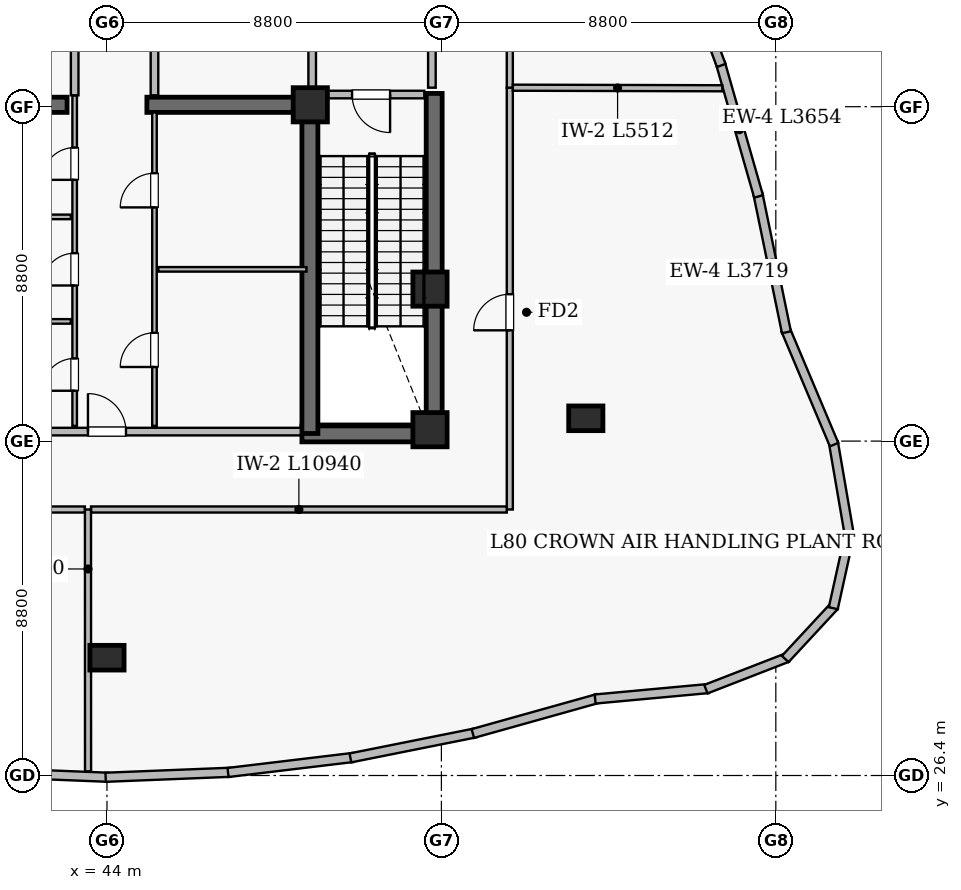
"""IFC4 building model, lengths in metres.
Left out: names, types, materials, properties, quantities, classifications, styles, units other than length and angle.
Written with IfcOpenShell. Run it as: python <this file> out.ifc"""

import sys

from ifc_helpers import new_model, si_unit, direction, frame, frame_2d, origin, origin_2d, place, context, subcontext, project, spatial, rectangle, extrude, element, fill, save


model = new_model("IFC4")
c1 = context("Model", 3, precision=1e-05, world=origin(), true_north=direction((0.0, 1.0)))
c2 = subcontext(c1, "Body", "Model", "MODEL_VIEW")
j1 = project(units=[si_unit("LENGTHUNIT", "METRE"), si_unit("PLANEANGLEUNIT", "RADIAN")], contexts=[c1])
p1 = place(None, origin())
s1 = spatial("IfcSite", under=j1, at=p1, CompositionType="ELEMENT")
p2 = place(p1, origin())
s2 = spatial("IfcBuilding", under=s1, at=p2, CompositionType="ELEMENT")
p3 = place(p2, frame((0.0, 0.0, 300.8)))
s3 = spatial("IfcBuildingStorey", under=s2, at=p3, CompositionType="ELEMENT", Elevation=300.8)
p4 = place(p3, frame((49.13, 35.39, 0.0), z_axis=(0.0, 0.0, 1.0), x_axis=(1.0, 0.0, 0.0)))
e1 = element("IfcWall", 1, at=p4, inside=s3, PredefinedType="SHEAR", context=c2, shape_type="SweptSolid", body=[
    extrude(rectangle(XDim=3.69, YDim=0.42, at=frame_2d((1.845, 0.0))), origin(), (0.0, 0.0, 1.0), 5.74),
])
p5 = place(p3, frame((52.61, 35.18, 0.0), z_axis=(0.0, 0.0, 1.0), x_axis=(0.0, 1.0, 0.0)))
e2 = element("IfcWall", 2, at=p5, inside=s3, PredefinedType="SHEAR", context=c2, shape_type="SweptSolid", body=[
    extrude(rectangle(XDim=9.17, YDim=0.42, at=frame_2d((4.585, 0.0))), origin(), (0.0, 0.0, 1.0), 5.74),
])
p6 = place(p3, frame((49.34, 35.4, 0.0), z_axis=(0.0, 0.0, 1.0), x_axis=(0.0, 1.0, 0.0)))
e3 = element("IfcWall", 3, at=p6, inside=s3, PredefinedType="SHEAR", context=c2, shape_type="SweptSolid", body=[
    extrude(rectangle(XDim=8.95, YDim=0.42, at=frame_2d((4.475, 0.0))), origin(), (0.0, 0.0, 1.0), 5.74),
])
for number, where, z_axis, x_axis in (
    (4, (38.75, 44.05, 0.0), (0.0, 0.0, 1.0), (1.0, 0.0, 0.0)),
    (5, (45.05, 44.05, 0.0), (0.0, 0.0, 1.0), (1.0, 0.0, 0.0)),
):
    element("IfcWall", number, at=place(p3, frame(where, z_axis=z_axis, x_axis=x_axis)), inside=s3, PredefinedType="SHEAR", context=c2, shape_type="SweptSolid", body=[
        extrude(rectangle(XDim=4.2, YDim=0.4, at=frame_2d((2.1, 0.0))), origin(), (0.0, 0.0, 1.0), 5.74),
    ])
for number, where, z_axis, x_axis in (
    (6, (52.5, 35.5, 0.0), (0.0, 0.0, 1.0), (1.0, 0.0, 0.0)),
    (7, (52.5, 39.2, 0.0), (0.0, 0.0, 1.0), (1.0, 0.0, 0.0)),
    (8, (49.35, 44.05, 0.0), (0.0, 0.0, 1.0), (1.0, 0.0, 0.0)),
):
    element("IfcColumn", number, at=place(p3, frame(where, z_axis=z_axis, x_axis=x_axis)), inside=s3, PredefinedType="COLUMN", context=c2, shape_type="SweptSolid", body=[
        extrude(rectangle(XDim=0.9, YDim=0.9, at=origin_2d()), origin(), (0.0, 0.0, 1.0), 6.0),
    ])
for number, where, z_axis, x_axis in (
    (9, (56.6, 35.8, 0.0), (0.0, 0.0, 1.0), (1.0, 0.0, 0.0)),
    (10, (44.0, 29.5, 0.0), (0.0, 0.0, 1.0), (1.0, 0.0, 0.0)),
):
    element("IfcColumn", number, at=place(p3, frame(where, z_axis=z_axis, x_axis=x_axis)), inside=s3, PredefinedType="COLUMN", context=c2, shape_type="SweptSolid", body=[
        extrude(rectangle(XDim=0.9, YDim=0.65, at=origin_2d()), origin(), (0.0, 0.0, 1.0), 6.0),
    ])
for number, where, z_axis, x_axis in (
    (11, (40.745, 26.485, 0.0), (0.0, 0.0, 1.0), (0.999, -0.04, 0.0)),
    (12, (43.965, 26.354, 0.0), (0.0, 0.0, 1.0), (0.999, 0.04, 0.0)),
):
    element("IfcWall", number, at=place(p3, frame(where, z_axis=z_axis, x_axis=x_axis)), inside=s3, PredefinedType="SOLIDWALL", context=c2, shape_type="SweptSolid", body=[
        extrude(rectangle(XDim=3.293, YDim=0.24, at=frame_2d((1.646, 0.0))), origin(), (0.0, 0.0, 1.0), 5.74),
    ])
p7 = place(p3, frame((47.186, 26.479, 0.0), z_axis=(0.0, 0.0, 1.0), x_axis=(0.992868119477, 0.119217856572, 0.0)))
e13 = element("IfcWall", 13, at=p7, inside=s3, PredefinedType="SOLIDWALL", context=c2, shape_type="SweptSolid", body=[
    extrude(rectangle(XDim=3.313, YDim=0.24, at=frame_2d((1.657, 0.0))), origin(), (0.0, 0.0, 1.0), 5.74),
])
p8 = place(p3, frame((50.406, 26.863, 0.0), z_axis=(0.0, 0.0, 1.0), x_axis=(0.980569475455, 0.196172128005, 0.0)))
e14 = element("IfcWall", 14, at=p8, inside=s3, PredefinedType="SOLIDWALL", context=c2, shape_type="SweptSolid", body=[
    extrude(rectangle(XDim=3.354, YDim=0.24, at=frame_2d((1.677, 0.0))), origin(), (0.0, 0.0, 1.0), 5.74),
])
p9 = place(p3, frame((53.627, 27.505, 0.0), z_axis=(0.0, 0.0, 1.0), x_axis=(0.962972931592, 0.269598095359, 0.0)))
e15 = element("IfcWall", 15, at=p9, inside=s3, PredefinedType="SOLIDWALL", context=c2, shape_type="SweptSolid", body=[
    extrude(rectangle(XDim=3.414, YDim=0.24, at=frame_2d((1.707, 0.0))), origin(), (0.0, 0.0, 1.0), 5.74),
])
p10 = place(p3, frame((56.846, 28.413, 0.0), z_axis=(0.0, 0.0, 1.0), x_axis=(0.995767942029, 0.091903240575, 0.0)))
e16 = element("IfcWall", 16, at=p10, inside=s3, PredefinedType="SOLIDWALL", context=c2, shape_type="SweptSolid", body=[
    extrude(rectangle(XDim=2.994, YDim=0.24, at=frame_2d((1.497, 0.0))), origin(), (0.0, 0.0, 1.0), 5.74),
])
p11 = place(p3, frame((59.76, 28.672, 0.0), z_axis=(0.0, 0.0, 1.0), x_axis=(0.932269297358, 0.361765058019, 0.0)))
e17 = element("IfcWall", 17, at=p11, inside=s3, PredefinedType="SOLIDWALL", context=c2, shape_type="SweptSolid", body=[
    extrude(rectangle(XDim=2.301, YDim=0.24, at=frame_2d((1.15, 0.0))), origin(), (0.0, 0.0, 1.0), 5.74),
])
p12 = place(p3, frame((61.848, 29.466, 0.0), z_axis=(0.0, 0.0, 1.0), x_axis=(0.680072395428, 0.733144963139, 0.0)))
e18 = element("IfcWall", 18, at=p12, inside=s3, PredefinedType="SOLIDWALL", context=c2, shape_type="SweptSolid", body=[
    extrude(rectangle(XDim=1.905, YDim=0.24, at=frame_2d((0.952, 0.0))), origin(), (0.0, 0.0, 1.0), 5.74),
])
p13 = place(p3, frame((63.112, 30.802, 0.0), z_axis=(0.0, 0.0, 1.0), x_axis=(0.215649526387, 0.976470829963, 0.0)))
e19 = element("IfcWall", 19, at=p13, inside=s3, PredefinedType="SOLIDWALL", context=c2, shape_type="SweptSolid", body=[
    extrude(rectangle(XDim=1.998, YDim=0.24, at=frame_2d((0.999, 0.0))), origin(), (0.0, 0.0, 1.0), 5.74),
])
p14 = place(p3, frame((63.542, 32.685, 0.0), z_axis=(0.0, 0.0, 1.0), x_axis=(-0.169240125324, 0.985574847477, 0.0)))
e20 = element("IfcWall", 20, at=p14, inside=s3, PredefinedType="SOLIDWALL", context=c2, shape_type="SweptSolid", body=[
    extrude(rectangle(XDim=2.526, YDim=0.24, at=frame_2d((1.263, 0.0))), origin(), (0.0, 0.0, 1.0), 5.74),
])
p15 = place(p3, frame((63.133, 35.107, 0.0), z_axis=(0.0, 0.0, 1.0), x_axis=(-0.388622520849, 0.921397056805, 0.0)))
e21 = element("IfcWall", 21, at=p15, inside=s3, PredefinedType="SOLIDWALL", context=c2, shape_type="SweptSolid", body=[
    extrude(rectangle(XDim=3.281, YDim=0.24, at=frame_2d((1.64, 0.0))), origin(), (0.0, 0.0, 1.0), 5.74),
])
p16 = place(p3, frame((61.879, 38.064, 0.0), z_axis=(0.0, 0.0, 1.0), x_axis=(-0.201578837363, 0.979472292782, 0.0)))
e22 = element("IfcWall", 22, at=p16, inside=s3, PredefinedType="SOLIDWALL", context=c2, shape_type="SweptSolid", body=[
    extrude(rectangle(XDim=3.719, YDim=0.24, at=frame_2d((1.86, 0.0))), origin(), (0.0, 0.0, 1.0), 5.74),
])
p17 = place(p3, frame((61.146, 41.639, 0.0), z_axis=(0.0, 0.0, 1.0), x_axis=(-0.274897629025, 0.961473501224, 0.0)))
e23 = element("IfcWall", 23, at=p17, inside=s3, PredefinedType="SOLIDWALL", context=c2, shape_type="SweptSolid", body=[
    extrude(rectangle(XDim=3.654, YDim=0.24, at=frame_2d((1.827, 0.0))), origin(), (0.0, 0.0, 1.0), 5.74),
])
p18 = place(p3, frame((60.163, 45.085, 0.0), z_axis=(0.0, 0.0, 1.0), x_axis=(-0.349073246867, 0.937095442483, 0.0)))
e24 = element("IfcWall", 24, at=p18, inside=s3, PredefinedType="SOLIDWALL", context=c2, shape_type="SweptSolid", body=[
    extrude(rectangle(XDim=0.705, YDim=0.24, at=frame_2d((0.353, 0.0))), origin(), (0.0, 0.0, 1.0), 5.74),
])
p19 = place(p3, frame((54.6, 33.4, 0.0), z_axis=(0.0, 0.0, 1.0), x_axis=(0.0, 1.0, 0.0)))
e25 = element("IfcWall", 25, at=p19, inside=s3, PredefinedType="SOLIDWALL", context=c2, shape_type="SweptSolid", body=[
    extrude(rectangle(XDim=11.1, YDim=0.16, at=frame_2d((5.55, 0.0))), origin(), (0.0, 0.0, 1.0), 5.24),
])
p20 = place(p19, frame((4.715, 0.0, 0.0)))
e26 = element("IfcOpeningElement", 26, at=p20, cuts=e25, PredefinedType="OPENING", context=c2, shape_type="SweptSolid", body=[
    extrude(rectangle(XDim=0.95, YDim=2.15, at=frame_2d((0.475, 1.075))), frame((0.0, 0.09, 0.0), z_axis=(0.0, -1.0, 0.0), x_axis=(1.0, 0.0, 0.0)), (0.0, 0.0, 1.0), 0.18),
])
p21 = place(p3, frame((38.9, 35.45, 0.0), z_axis=(0.0, 0.0, 1.0), x_axis=(1.0, 0.0, 0.0)))
e27 = element("IfcWall", 27, at=p21, inside=s3, PredefinedType="SOLIDWALL", context=c2, shape_type="SweptSolid", body=[
    extrude(rectangle(XDim=10.2, YDim=0.2, at=frame_2d((5.1, 0.0))), origin(), (0.0, 0.0, 1.0), 5.74),
])
p22 = place(p21, frame((4.6, 0.0, 0.0)))
e28 = element("IfcOpeningElement", 28, at=p22, cuts=e27, PredefinedType="OPENING", context=c2, shape_type="SweptSolid", body=[
    extrude(rectangle(XDim=1.0, YDim=2.15, at=frame_2d((0.5, 1.075))), frame((0.0, 0.11, 0.0), z_axis=(0.0, -1.0, 0.0), x_axis=(1.0, 0.0, 0.0)), (0.0, 0.0, 1.0), 0.22),
])
p23 = place(p3, frame((43.15, 35.6, 0.0), z_axis=(0.0, 0.0, 1.0), x_axis=(0.0, 1.0, 0.0)))
e29 = element("IfcWall", 29, at=p23, inside=s3, PredefinedType="PARTITIONING", context=c2, shape_type="SweptSolid", body=[
    extrude(rectangle(XDim=8.7, YDim=0.12, at=frame_2d((4.35, 0.0))), origin(), (0.0, 0.0, 1.0), 5.74),
])
p24 = place(p23, frame((0.925, 0.0, 0.0)))
e30 = element("IfcOpeningElement", 30, at=p24, cuts=e29, PredefinedType="OPENING", context=c2, shape_type="SweptSolid", body=[
    extrude(rectangle(XDim=0.85, YDim=2.1, at=frame_2d((0.425, 1.05))), frame((0.0, 0.07, 0.0), z_axis=(0.0, -1.0, 0.0), x_axis=(1.0, 0.0, 0.0)), (0.0, 0.0, 1.0), 0.14),
])
p25 = place(p23, frame((3.695, 0.0, 0.0)))
e31 = element("IfcOpeningElement", 31, at=p25, cuts=e29, PredefinedType="OPENING", context=c2, shape_type="SweptSolid", body=[
    extrude(rectangle(XDim=0.85, YDim=2.1, at=frame_2d((0.425, 1.05))), frame((0.0, 0.07, 0.0), z_axis=(0.0, -1.0, 0.0), x_axis=(1.0, 0.0, 0.0)), (0.0, 0.0, 1.0), 0.14),
])
p26 = place(p23, frame((6.475, 0.0, 0.0)))
e32 = element("IfcOpeningElement", 32, at=p26, cuts=e29, PredefinedType="OPENING", context=c2, shape_type="SweptSolid", body=[
    extrude(rectangle(XDim=0.85, YDim=2.1, at=frame_2d((0.425, 1.05))), frame((0.0, 0.07, 0.0), z_axis=(0.0, -1.0, 0.0), x_axis=(1.0, 0.0, 0.0)), (0.0, 0.0, 1.0), 0.14),
])
p27 = place(p3, frame((45.25, 35.6, 0.0), z_axis=(0.0, 0.0, 1.0), x_axis=(0.0, 1.0, 0.0)))
e33 = element("IfcWall", 33, at=p27, inside=s3, PredefinedType="PARTITIONING", context=c2, shape_type="SweptSolid", body=[
    extrude(rectangle(XDim=8.25, YDim=0.12, at=frame_2d((4.125, 0.0))), origin(), (0.0, 0.0, 1.0), 5.74),
])
p28 = place(p27, frame((1.55, 0.0, 0.0)))
e34 = element("IfcOpeningElement", 34, at=p28, cuts=e33, PredefinedType="OPENING", context=c2, shape_type="SweptSolid", body=[
    extrude(rectangle(XDim=0.9, YDim=2.1, at=frame_2d((0.45, 1.05))), frame((0.0, 0.07, 0.0), z_axis=(0.0, -1.0, 0.0), x_axis=(1.0, 0.0, 0.0)), (0.0, 0.0, 1.0), 0.14),
])
p29 = place(p27, frame((5.75, 0.0, 0.0)))
e35 = element("IfcOpeningElement", 35, at=p29, cuts=e33, PredefinedType="OPENING", context=c2, shape_type="SweptSolid", body=[
    extrude(rectangle(XDim=0.9, YDim=2.1, at=frame_2d((0.45, 1.05))), frame((0.0, 0.07, 0.0), z_axis=(0.0, -1.0, 0.0), x_axis=(1.0, 0.0, 0.0)), (0.0, 0.0, 1.0), 0.14),
])
p30 = place(p3, frame((52.55, 44.5, 0.0), z_axis=(0.0, 0.0, 1.0), x_axis=(0.0, 1.0, 0.0)))
e36 = element("IfcWall", 36, at=p30, inside=s3, PredefinedType="SOLIDWALL", context=c2, shape_type="SweptSolid", body=[
    extrude(rectangle(XDim=7.92, YDim=0.2, at=frame_2d((3.96, 0.0))), origin(), (0.0, 0.0, 1.0), 5.74),
])
p31 = place(p30, frame((2.6, 0.0, 0.0)))
e37 = element("IfcOpeningElement", 37, at=p31, cuts=e36, PredefinedType="OPENING", context=c2, shape_type="SweptSolid", body=[
    extrude(rectangle(XDim=1.0, YDim=2.15, at=frame_2d((0.5, 1.075))), frame((0.0, 0.11, 0.0), z_axis=(0.0, -1.0, 0.0), x_axis=(1.0, 0.0, 0.0)), (0.0, 0.0, 1.0), 0.22),
])
p32 = place(p3, frame((49.4, 44.5, 0.0), z_axis=(0.0, 0.0, 1.0), x_axis=(0.0, 1.0, 0.0)))
e38 = element("IfcWall", 38, at=p32, inside=s3, PredefinedType="SOLIDWALL", context=c2, shape_type="SweptSolid", body=[
    extrude(rectangle(XDim=7.92, YDim=0.2, at=frame_2d((3.96, 0.0))), origin(), (0.0, 0.0, 1.0), 4.828),
])
p33 = place(p32, frame((3.425, 0.0, 0.0)))
e39 = element("IfcOpeningElement", 39, at=p33, cuts=e38, PredefinedType="OPENING", context=c2, shape_type="SweptSolid", body=[
    extrude(rectangle(XDim=0.95, YDim=2.15, at=frame_2d((0.475, 1.075))), frame((0.0, 0.11, 0.0), z_axis=(0.0, -1.0, 0.0), x_axis=(1.0, 0.0, 0.0)), (0.0, 0.0, 1.0), 0.22),
])
p34 = place(p3, frame((49.55, 44.32, 0.0), z_axis=(0.0, 0.0, 1.0), x_axis=(1.0, 0.0, 0.0)))
e40 = element("IfcWall", 40, at=p34, inside=s3, PredefinedType="SOLIDWALL", context=c2, shape_type="SweptSolid", body=[
    extrude(rectangle(XDim=2.8, YDim=0.2, at=frame_2d((1.4, 0.0))), origin(), (0.0, 0.0, 1.0), 4.828),
])
p35 = place(p34, frame((0.9, 0.0, 0.0)))
e41 = element("IfcOpeningElement", 41, at=p35, cuts=e40, PredefinedType="OPENING", context=c2, shape_type="SweptSolid", body=[
    extrude(rectangle(XDim=1.0, YDim=2.15, at=frame_2d((0.5, 1.075))), frame((0.0, 0.11, 0.0), z_axis=(0.0, -1.0, 0.0), x_axis=(1.0, 0.0, 0.0)), (0.0, 0.0, 1.0), 0.22),
])
p36 = place(p3, frame((43.58, 33.4, 0.0), z_axis=(0.0, 0.0, 1.0), x_axis=(1.0, 0.0, 0.0)))
e42 = element("IfcWall", 42, at=p36, inside=s3, PredefinedType="SOLIDWALL", context=c2, shape_type="SweptSolid", body=[
    extrude(rectangle(XDim=10.94, YDim=0.16, at=frame_2d((5.47, 0.0))), origin(), (0.0, 0.0, 1.0), 5.24),
])
p37 = place(p3, frame((33.48, 33.4, 0.0), z_axis=(0.0, 0.0, 1.0), x_axis=(1.0, 0.0, 0.0)))
e43 = element("IfcWall", 43, at=p37, inside=s3, PredefinedType="SOLIDWALL", context=c2, shape_type="SweptSolid", body=[
    extrude(rectangle(XDim=9.94, YDim=0.16, at=frame_2d((4.97, 0.0))), origin(), (0.0, 0.0, 1.0), 5.24),
])
p38 = place(p3, frame((54.6, 44.5, 0.0), z_axis=(0.0, 0.0, 1.0), x_axis=(0.0, 1.0, 0.0)))
e44 = element("IfcWall", 44, at=p38, inside=s3, PredefinedType="SOLIDWALL", context=c2, shape_type="SweptSolid", body=[
    extrude(rectangle(XDim=7.95, YDim=0.16, at=frame_2d((3.975, 0.0))), origin(), (0.0, 0.0, 1.0), 5.24),
])
p39 = place(p3, frame((43.502, 26.51, 0.0), z_axis=(0.0, 0.0, 1.0), x_axis=(-0.000283476832, 0.99999995982, 0.0)))
e45 = element("IfcWall", 45, at=p39, inside=s3, PredefinedType="SOLIDWALL", context=c2, shape_type="SweptSolid", body=[
    extrude(rectangle(XDim=6.89, YDim=0.16, at=frame_2d((3.445, 0.0))), origin(), (0.0, 0.0, 1.0), 5.24),
])
p40 = place(p3, frame((60.192, 44.485, 0.0), z_axis=(0.0, 0.0, 1.0), x_axis=(-0.999996349983, 0.002701854868, 0.0)))
e46 = element("IfcWall", 46, at=p40, inside=s3, PredefinedType="SOLIDWALL", context=c2, shape_type="SweptSolid", body=[
    extrude(rectangle(XDim=5.512, YDim=0.16, at=frame_2d((2.756, 0.0))), origin(), (0.0, 0.0, 1.0), 5.24),
])
for number, where, z_axis, x_axis in (
    (47, (38.75, 38.35, 0.0), (0.0, 0.0, 1.0), (1.0, 0.0, 0.0)),
    (48, (38.75, 41.1, 0.0), (0.0, 0.0, 1.0), (1.0, 0.0, 0.0)),
):
    element("IfcWall", number, at=place(p3, frame(where, z_axis=z_axis, x_axis=x_axis)), inside=s3, PredefinedType="PARTITIONING", context=c2, shape_type="SweptSolid", body=[
        extrude(rectangle(XDim=4.3, YDim=0.12, at=frame_2d((2.15, 0.0))), origin(), (0.0, 0.0, 1.0), 5.74),
    ])
p41 = place(p3, frame((45.35, 39.72, 0.0), z_axis=(0.0, 0.0, 1.0), x_axis=(1.0, 0.0, 0.0)))
e49 = element("IfcWall", 49, at=p41, inside=s3, PredefinedType="PARTITIONING", context=c2, shape_type="SweptSolid", body=[
    extrude(rectangle(XDim=3.9, YDim=0.12, at=frame_2d((1.95, 0.0))), origin(), (0.0, 0.0, 1.0), 5.74),
])
for number, where, z_axis, x_axis in (
    (50, (43.15, 44.3, 0.0), (0.0, 0.0, 1.0), (0.0, 1.0, 0.0)),
    (51, (45.25, 44.3, 0.0), (0.0, 0.0, 1.0), (0.0, 1.0, 0.0)),
):
    element("IfcWall", number, at=place(p3, frame(where, z_axis=z_axis, x_axis=x_axis)), inside=s3, PredefinedType="SOLIDWALL", context=c2, shape_type="SweptSolid", body=[
        extrude(rectangle(XDim=2.58, YDim=0.2, at=frame_2d((1.29, 0.0))), origin(), (0.0, 0.0, 1.0), 5.74),
    ])
p42 = place(p35, frame((1.0, 0.0, 0.0), z_axis=(0.0, 0.0, 1.0), x_axis=(-1.0, 0.0, 0.0)))
e52 = element("IfcDoor", 52, at=p42, inside=s3, OperationType="SINGLE_SWING_RIGHT", PredefinedType="DOOR", context=c2, shape_type="SweptSolid", body=[
    extrude(rectangle(XDim=1.0, YDim=2.15, at=frame_2d((0.5, 1.075))), frame((0.0, 0.025, 0.0), z_axis=(0.0, -1.0, 0.0), x_axis=(1.0, 0.0, 0.0)), (0.0, 0.0, 1.0), 0.05),
])
fill(e41, e52)
p43 = place(p22, origin())
e53 = element("IfcDoor", 53, at=p43, inside=s3, OperationType="SINGLE_SWING_LEFT", PredefinedType="DOOR", context=c2, shape_type="SweptSolid", body=[
    extrude(rectangle(XDim=1.0, YDim=2.15, at=frame_2d((0.5, 1.075))), frame((0.0, 0.025, 0.0), z_axis=(0.0, -1.0, 0.0), x_axis=(1.0, 0.0, 0.0)), (0.0, 0.0, 1.0), 0.05),
])
fill(e28, e53)
p44 = place(p24, origin())
e54 = element("IfcDoor", 54, at=p44, inside=s3, OperationType="SINGLE_SWING_LEFT", PredefinedType="DOOR", context=c2, shape_type="SweptSolid", body=[
    extrude(rectangle(XDim=0.85, YDim=2.1, at=frame_2d((0.425, 1.05))), frame((0.0, 0.025, 0.0), z_axis=(0.0, -1.0, 0.0), x_axis=(1.0, 0.0, 0.0)), (0.0, 0.0, 1.0), 0.05),
])
fill(e30, e54)
p45 = place(p25, origin())
e55 = element("IfcDoor", 55, at=p45, inside=s3, OperationType="SINGLE_SWING_LEFT", PredefinedType="DOOR", context=c2, shape_type="SweptSolid", body=[
    extrude(rectangle(XDim=0.85, YDim=2.1, at=frame_2d((0.425, 1.05))), frame((0.0, 0.025, 0.0), z_axis=(0.0, -1.0, 0.0), x_axis=(1.0, 0.0, 0.0)), (0.0, 0.0, 1.0), 0.05),
])
fill(e31, e55)
p46 = place(p26, origin())
e56 = element("IfcDoor", 56, at=p46, inside=s3, OperationType="SINGLE_SWING_LEFT", PredefinedType="DOOR", context=c2, shape_type="SweptSolid", body=[
    extrude(rectangle(XDim=0.85, YDim=2.1, at=frame_2d((0.425, 1.05))), frame((0.0, 0.025, 0.0), z_axis=(0.0, -1.0, 0.0), x_axis=(1.0, 0.0, 0.0)), (0.0, 0.0, 1.0), 0.05),
])
fill(e32, e56)
p47 = place(p28, origin())
e57 = element("IfcDoor", 57, at=p47, inside=s3, OperationType="SINGLE_SWING_LEFT", PredefinedType="DOOR", context=c2, shape_type="SweptSolid", body=[
    extrude(rectangle(XDim=0.9, YDim=2.1, at=frame_2d((0.45, 1.05))), frame((0.0, 0.025, 0.0), z_axis=(0.0, -1.0, 0.0), x_axis=(1.0, 0.0, 0.0)), (0.0, 0.0, 1.0), 0.05),
])
fill(e34, e57)
p48 = place(p29, origin())
e58 = element("IfcDoor", 58, at=p48, inside=s3, OperationType="SINGLE_SWING_LEFT", PredefinedType="DOOR", context=c2, shape_type="SweptSolid", body=[
    extrude(rectangle(XDim=0.9, YDim=2.1, at=frame_2d((0.45, 1.05))), frame((0.0, 0.025, 0.0), z_axis=(0.0, -1.0, 0.0), x_axis=(1.0, 0.0, 0.0)), (0.0, 0.0, 1.0), 0.05),
])
fill(e35, e58)
p49 = place(p20, origin())
e59 = element("IfcDoor", 59, at=p49, inside=s3, OperationType="SINGLE_SWING_LEFT", PredefinedType="DOOR", context=c2, shape_type="SweptSolid", body=[
    extrude(rectangle(XDim=0.95, YDim=2.15, at=frame_2d((0.475, 1.075))), frame((0.0, 0.025, 0.0), z_axis=(0.0, -1.0, 0.0), x_axis=(1.0, 0.0, 0.0)), (0.0, 0.0, 1.0), 0.05),
])
fill(e26, e59)
save(model, sys.argv[1])
